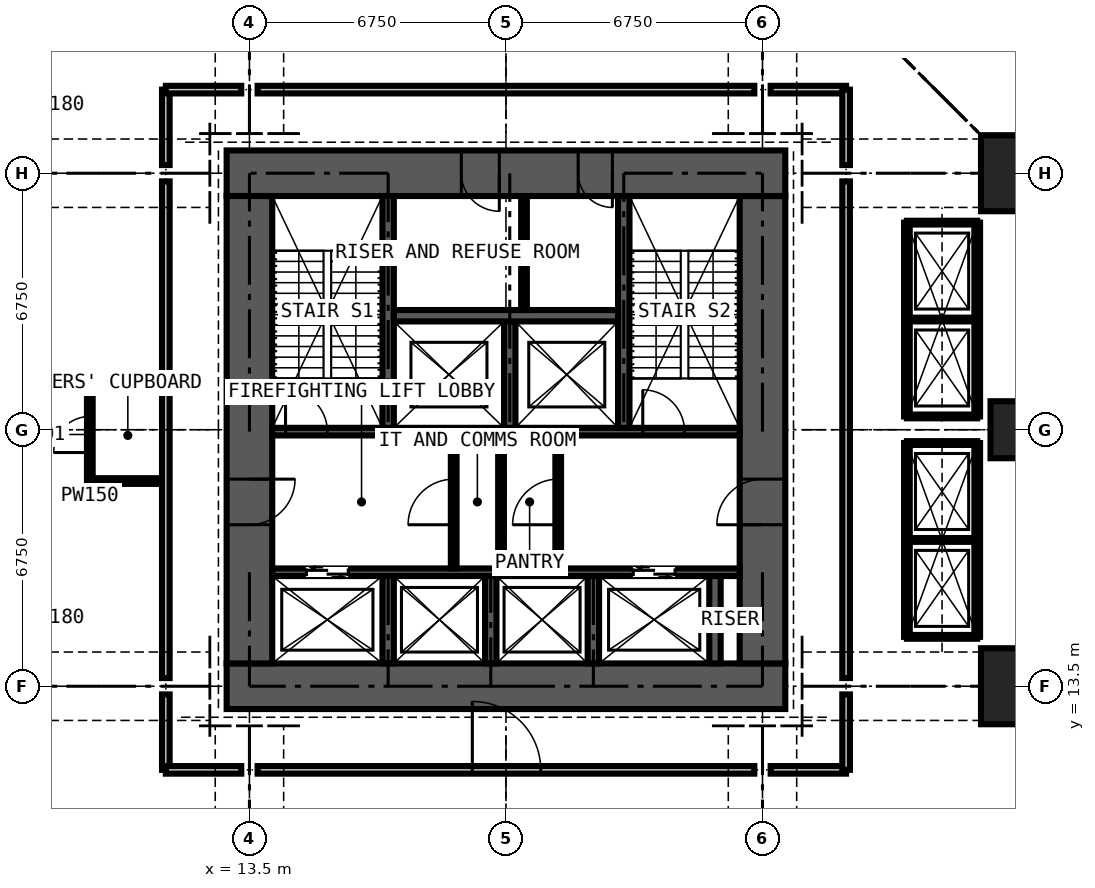
"""IFC4 building model, lengths in metres.
Left out: names, types, materials, properties, quantities, classifications, styles, units other than length and angle.
Written with IfcOpenShell. Run it as: python <this file> out.ifc"""

import sys

from ifc_helpers import new_model, si_unit, direction, frame, frame_2d, origin, origin_2d, place, context, subcontext, project, spatial, rectangle, extrude, element, fill, save


model = new_model("IFC4")
c1 = context("Model", 3, precision=1e-05, world=origin(), true_north=direction((0.0, 1.0)))
c2 = subcontext(c1, "Body", "Model", "MODEL_VIEW")
j1 = project(units=[si_unit("LENGTHUNIT", "METRE"), si_unit("PLANEANGLEUNIT", "RADIAN")], contexts=[c1])
p1 = place(None, origin())
s1 = spatial("IfcSite", under=j1, at=p1, CompositionType="ELEMENT")
p2 = place(p1, origin())
s2 = spatial("IfcBuilding", under=s1, at=p2, CompositionType="ELEMENT")
p3 = place(p2, frame((0.0, 0.0, 137.7)))
s3 = spatial("IfcBuildingStorey", under=s2, at=p3, CompositionType="ELEMENT", Elevation=137.7)
p4 = place(p3, frame((33.75, 13.5, 0.0), z_axis=(0.0, 0.0, 1.0), x_axis=(1.0, 0.0, 0.0)))
e1 = element("IfcColumn", 1, at=p4, inside=s3, PredefinedType="COLUMN", context=c2, shape_type="SweptSolid", body=[
    extrude(rectangle(XDim=2.0, YDim=2.0, at=origin_2d()), origin(), (0.0, 0.0, 1.0), 4.5),
])
p5 = place(p3, frame((33.75, 20.25, 0.0), z_axis=(0.0, 0.0, 1.0), x_axis=(1.0, 0.0, 0.0)))
e2 = element("IfcColumn", 2, at=p5, inside=s3, PredefinedType="COLUMN", context=c2, shape_type="SweptSolid", body=[
    extrude(rectangle(XDim=1.5, YDim=1.5, at=origin_2d()), origin(), (0.0, 0.0, 1.0), 4.5),
])
p6 = place(p3, frame((33.75, 27.0, 0.0), z_axis=(0.0, 0.0, 1.0), x_axis=(1.0, 0.0, 0.0)))
e3 = element("IfcColumn", 3, at=p6, inside=s3, PredefinedType="COLUMN", context=c2, shape_type="SweptSolid", body=[
    extrude(rectangle(XDim=2.0, YDim=2.0, at=origin_2d()), origin(), (0.0, 0.0, 1.0), 4.5),
])
p7 = place(p3, frame((12.9, 13.5, 0.0), z_axis=(0.0, 0.0, 1.0), x_axis=(1.0, 0.0, 0.0)))
e4 = element("IfcWall", 4, at=p7, inside=s3, PredefinedType="SHEAR", context=c2, shape_type="SweptSolid", body=[
    extrude(rectangle(XDim=14.7, YDim=1.2, at=frame_2d((7.35, 0.0))), origin(), (0.0, 0.0, 1.0), 4.5),
])
p8 = place(p3, frame((27.0, 14.1, 0.0), z_axis=(0.0, 0.0, 1.0), x_axis=(0.0, 1.0, 0.0)))
e5 = element("IfcWall", 5, at=p8, inside=s3, PredefinedType="SHEAR", context=c2, shape_type="SweptSolid", body=[
    extrude(rectangle(XDim=12.3, YDim=1.2, at=frame_2d((6.15, 0.0))), origin(), (0.0, 0.0, 1.0), 4.5),
])
p9 = place(p8, frame((3.65, 0.0, 0.0)))
e6 = element("IfcOpeningElement", 6, at=p9, cuts=e5, PredefinedType="OPENING", context=c2, shape_type="SweptSolid", body=[
    extrude(rectangle(XDim=1.2, YDim=2.2, at=frame_2d((0.6, 1.1))), frame((0.0, 0.61, 0.0), z_axis=(0.0, -1.0, 0.0), x_axis=(1.0, 0.0, 0.0)), (0.0, 0.0, 1.0), 1.22),
])
p10 = place(p3, frame((27.6, 27.0, 0.0), z_axis=(0.0, 0.0, 1.0), x_axis=(-1.0, 0.0, 0.0)))
e7 = element("IfcWall", 7, at=p10, inside=s3, PredefinedType="SHEAR", context=c2, shape_type="SweptSolid", body=[
    extrude(rectangle(XDim=14.7, YDim=1.2, at=frame_2d((7.35, 0.0))), origin(), (0.0, 0.0, 1.0), 4.5),
])
p11 = place(p10, frame((4.55, 0.0, 0.0)))
e8 = element("IfcOpeningElement", 8, at=p11, cuts=e7, PredefinedType="OPENING", context=c2, shape_type="SweptSolid", body=[
    extrude(rectangle(XDim=0.9, YDim=2.2, at=frame_2d((0.45, 1.1))), frame((0.0, 0.61, 0.0), z_axis=(0.0, -1.0, 0.0), x_axis=(1.0, 0.0, 0.0)), (0.0, 0.0, 1.0), 1.22),
])
p12 = place(p10, frame((7.525, 0.0, 0.0)))
e9 = element("IfcOpeningElement", 9, at=p12, cuts=e7, PredefinedType="OPENING", context=c2, shape_type="SweptSolid", body=[
    extrude(rectangle(XDim=1.0, YDim=2.2, at=frame_2d((0.5, 1.1))), frame((0.0, 0.61, 0.0), z_axis=(0.0, -1.0, 0.0), x_axis=(1.0, 0.0, 0.0)), (0.0, 0.0, 1.0), 1.22),
])
p13 = place(p3, frame((13.5, 26.4, 0.0), z_axis=(0.0, 0.0, 1.0), x_axis=(0.0, -1.0, 0.0)))
e10 = element("IfcWall", 10, at=p13, inside=s3, PredefinedType="SHEAR", context=c2, shape_type="SweptSolid", body=[
    extrude(rectangle(XDim=12.3, YDim=1.2, at=frame_2d((6.15, 0.0))), origin(), (0.0, 0.0, 1.0), 4.5),
])
p14 = place(p13, frame((7.45, 0.0, 0.0)))
e11 = element("IfcOpeningElement", 11, at=p14, cuts=e10, PredefinedType="OPENING", context=c2, shape_type="SweptSolid", body=[
    extrude(rectangle(XDim=1.2, YDim=2.2, at=frame_2d((0.6, 1.1))), frame((0.0, 0.61, 0.0), z_axis=(0.0, -1.0, 0.0), x_axis=(1.0, 0.0, 0.0)), (0.0, 0.0, 1.0), 1.22),
])
p15 = place(p3, frame((14.1, 16.5, 0.0), z_axis=(0.0, 0.0, 1.0), x_axis=(1.0, 0.0, 0.0)))
e12 = element("IfcWall", 12, at=p15, inside=s3, PredefinedType="SHEAR", context=c2, shape_type="SweptSolid", body=[
    extrude(rectangle(XDim=12.3, YDim=0.2, at=frame_2d((6.15, 0.0))), origin(), (0.0, 0.0, 1.0), 4.5),
])
p16 = place(p15, frame((0.9, 0.0, 0.0)))
e13 = element("IfcOpeningElement", 13, at=p16, cuts=e12, PredefinedType="OPENING", context=c2, shape_type="SweptSolid", body=[
    extrude(rectangle(XDim=1.1, YDim=2.2, at=frame_2d((0.55, 1.1))), frame((0.0, 0.11, 0.0), z_axis=(0.0, -1.0, 0.0), x_axis=(1.0, 0.0, 0.0)), (0.0, 0.0, 1.0), 0.22),
])
p17 = place(p15, frame((9.5, 0.0, 0.0)))
e14 = element("IfcOpeningElement", 14, at=p17, cuts=e12, PredefinedType="OPENING", context=c2, shape_type="SweptSolid", body=[
    extrude(rectangle(XDim=1.1, YDim=2.2, at=frame_2d((0.55, 1.1))), frame((0.0, 0.11, 0.0), z_axis=(0.0, -1.0, 0.0), x_axis=(1.0, 0.0, 0.0)), (0.0, 0.0, 1.0), 0.22),
])
p18 = place(p3, frame((14.1, 20.2, 0.0), z_axis=(0.0, 0.0, 1.0), x_axis=(1.0, 0.0, 0.0)))
e15 = element("IfcWall", 15, at=p18, inside=s3, PredefinedType="SHEAR", context=c2, shape_type="SweptSolid", body=[
    extrude(rectangle(XDim=12.3, YDim=0.2, at=frame_2d((6.15, 0.0))), origin(), (0.0, 0.0, 1.0), 4.5),
])
p19 = place(p18, frame((0.35, 0.0, 0.0)))
e16 = element("IfcOpeningElement", 16, at=p19, cuts=e15, PredefinedType="OPENING", context=c2, shape_type="SweptSolid", body=[
    extrude(rectangle(XDim=1.1, YDim=2.2, at=frame_2d((0.55, 1.1))), frame((0.0, 0.11, 0.0), z_axis=(0.0, -1.0, 0.0), x_axis=(1.0, 0.0, 0.0)), (0.0, 0.0, 1.0), 0.22),
])
p20 = place(p18, frame((9.75, 0.0, 0.0)))
e17 = element("IfcOpeningElement", 17, at=p20, cuts=e15, PredefinedType="OPENING", context=c2, shape_type="SweptSolid", body=[
    extrude(rectangle(XDim=1.1, YDim=2.2, at=frame_2d((0.55, 1.1))), frame((0.0, 0.11, 0.0), z_axis=(0.0, -1.0, 0.0), x_axis=(1.0, 0.0, 0.0)), (0.0, 0.0, 1.0), 0.22),
])
for number, where, z_axis, x_axis in (
    (18, (17.15, 20.3, 0.0), (0.0, 0.0, 1.0), (0.0, 1.0, 0.0)),
    (19, (23.35, 20.3, 0.0), (0.0, 0.0, 1.0), (0.0, 1.0, 0.0)),
):
    element("IfcWall", number, at=place(p3, frame(where, z_axis=z_axis, x_axis=x_axis)), inside=s3, PredefinedType="SHEAR", context=c2, shape_type="SweptSolid", body=[
        extrude(rectangle(XDim=6.1, YDim=0.3, at=frame_2d((3.05, 0.0))), origin(), (0.0, 0.0, 1.0), 4.5),
    ])
p21 = place(p3, frame((20.35, 20.3, 0.0), z_axis=(0.0, 0.0, 1.0), x_axis=(0.0, 1.0, 0.0)))
e20 = element("IfcWall", 20, at=p21, inside=s3, PredefinedType="SHEAR", context=c2, shape_type="SweptSolid", body=[
    extrude(rectangle(XDim=2.8, YDim=0.3, at=frame_2d((1.4, 0.0))), origin(), (0.0, 0.0, 1.0), 4.5),
])
p22 = place(p3, frame((17.3, 23.25, 0.0), z_axis=(0.0, 0.0, 1.0), x_axis=(1.0, 0.0, 0.0)))
e21 = element("IfcWall", 21, at=p22, inside=s3, PredefinedType="SHEAR", context=c2, shape_type="SweptSolid", body=[
    extrude(rectangle(XDim=5.9, YDim=0.3, at=frame_2d((2.95, 0.0))), origin(), (0.0, 0.0, 1.0), 4.5),
])
for number, where, z_axis, x_axis in (
    (22, (17.15, 14.1, 0.0), (0.0, 0.0, 1.0), (0.0, 1.0, 0.0)),
    (23, (19.85, 14.1, 0.0), (0.0, 0.0, 1.0), (0.0, 1.0, 0.0)),
    (24, (22.55, 14.1, 0.0), (0.0, 0.0, 1.0), (0.0, 1.0, 0.0)),
    (25, (25.75, 14.1, 0.0), (0.0, 0.0, 1.0), (0.0, 1.0, 0.0)),
):
    element("IfcWall", number, at=place(p3, frame(where, z_axis=z_axis, x_axis=x_axis)), inside=s3, PredefinedType="SHEAR", context=c2, shape_type="SweptSolid", body=[
        extrude(rectangle(XDim=2.3, YDim=0.3, at=frame_2d((1.15, 0.0))), origin(), (0.0, 0.0, 1.0), 4.5),
    ])
p23 = place(p3, frame((18.875, 16.6, 0.0), z_axis=(0.0, 0.0, 1.0), x_axis=(0.0, 1.0, 0.0)))
e26 = element("IfcWall", 26, at=p23, inside=s3, PredefinedType="PARTITIONING", context=c2, shape_type="SweptSolid", body=[
    extrude(rectangle(XDim=3.5, YDim=0.15, at=frame_2d((1.75, 0.0))), origin(), (0.0, 0.0, 1.0), 4.15),
])
p24 = place(p23, frame((1.15, 0.0, 0.0)))
e27 = element("IfcOpeningElement", 27, at=p24, cuts=e26, PredefinedType="OPENING", context=c2, shape_type="SweptSolid", body=[
    extrude(rectangle(XDim=1.2, YDim=2.2, at=frame_2d((0.6, 1.1))), frame((0.0, 0.085, 0.0), z_axis=(0.0, -1.0, 0.0), x_axis=(1.0, 0.0, 0.0)), (0.0, 0.0, 1.0), 0.17),
])
p25 = place(p3, frame((21.625, 16.6, 0.0), z_axis=(0.0, 0.0, 1.0), x_axis=(0.0, 1.0, 0.0)))
e28 = element("IfcWall", 28, at=p25, inside=s3, PredefinedType="PARTITIONING", context=c2, shape_type="SweptSolid", body=[
    extrude(rectangle(XDim=3.5, YDim=0.15, at=frame_2d((1.75, 0.0))), origin(), (0.0, 0.0, 1.0), 4.15),
])
p26 = place(p25, frame((1.15, 0.0, 0.0)))
e29 = element("IfcOpeningElement", 29, at=p26, cuts=e28, PredefinedType="OPENING", context=c2, shape_type="SweptSolid", body=[
    extrude(rectangle(XDim=1.2, YDim=2.2, at=frame_2d((0.6, 1.1))), frame((0.0, 0.085, 0.0), z_axis=(0.0, -1.0, 0.0), x_axis=(1.0, 0.0, 0.0)), (0.0, 0.0, 1.0), 0.17),
])
p27 = place(p3, frame((20.12, 16.6, 0.0), z_axis=(0.0, 0.0, 1.0), x_axis=(0.0, 1.0, 0.0)))
e30 = element("IfcWall", 30, at=p27, inside=s3, PredefinedType="PARTITIONING", context=c2, shape_type="SweptSolid", body=[
    extrude(rectangle(XDim=3.5, YDim=0.15, at=frame_2d((1.75, 0.0))), origin(), (0.0, 0.0, 1.0), 4.15),
])
p28 = place(p3, frame((20.725, 23.4, 0.0), z_axis=(0.0, 0.0, 1.0), x_axis=(0.0, 1.0, 0.0)))
e31 = element("IfcWall", 31, at=p28, inside=s3, PredefinedType="PARTITIONING", context=c2, shape_type="SweptSolid", body=[
    extrude(rectangle(XDim=3.0, YDim=0.15, at=frame_2d((1.5, 0.0))), origin(), (0.0, 0.0, 1.0), 4.15),
])
p29 = place(p3, frame((9.3, 18.9, 0.0), z_axis=(0.0, 0.0, 1.0), x_axis=(0.0, 1.0, 0.0)))
e32 = element("IfcWall", 32, at=p29, inside=s3, PredefinedType="PARTITIONING", context=c2, shape_type="SweptSolid", body=[
    extrude(rectangle(XDim=2.4, YDim=0.15, at=frame_2d((1.2, 0.0))), origin(), (0.0, 0.0, 1.0), 4.15),
])
p30 = place(p29, frame((0.75, 0.0, 0.0)))
e33 = element("IfcOpeningElement", 33, at=p30, cuts=e32, PredefinedType="OPENING", context=c2, shape_type="SweptSolid", body=[
    extrude(rectangle(XDim=0.95, YDim=2.2, at=frame_2d((0.475, 1.1))), frame((0.0, 0.085, 0.0), z_axis=(0.0, -1.0, 0.0), x_axis=(1.0, 0.0, 0.0)), (0.0, 0.0, 1.0), 0.17),
])
for number, where, z_axis, x_axis in (
    (34, (9.3, 18.9, 0.0), (0.0, 0.0, 1.0), (1.0, 0.0, 0.0)),
    (35, (9.3, 21.3, 0.0), (0.0, 0.0, 1.0), (1.0, 0.0, 0.0)),
):
    element("IfcWall", number, at=place(p3, frame(where, z_axis=z_axis, x_axis=x_axis)), inside=s3, PredefinedType="PARTITIONING", context=c2, shape_type="SweptSolid", body=[
        extrude(rectangle(XDim=2.0, YDim=0.15, at=frame_2d((1.0, 0.0))), origin(), (0.0, 0.0, 1.0), 4.15),
    ])
for number, where, z_axis, x_axis in (
    (36, (11.3, 11.3, 0.0), (0.0, 0.0, 1.0), (0.0, 1.0, 0.0)),
    (37, (11.3, 11.3, 0.0), (0.0, 0.0, 1.0), (1.0, 0.0, 0.0)),
):
    element("IfcWall", number, at=place(p3, frame(where, z_axis=z_axis, x_axis=x_axis)), inside=s3, PredefinedType="PARTITIONING", context=c2, shape_type="SweptSolid", body=[
        extrude(rectangle(XDim=1.985, YDim=0.2, at=frame_2d((0.992, 0.0))), origin(), (0.0, 0.0, 1.0), 4.15),
    ])
p31 = place(p3, frame((11.3, 13.715, 0.0), z_axis=(0.0, 0.0, 1.0), x_axis=(0.0, 1.0, 0.0)))
e38 = element("IfcWall", 38, at=p31, inside=s3, PredefinedType="PARTITIONING", context=c2, shape_type="SweptSolid", body=[
    extrude(rectangle(XDim=13.07, YDim=0.2, at=frame_2d((6.535, 0.0))), origin(), (0.0, 0.0, 1.0), 4.15),
])
for number, where, z_axis, x_axis in (
    (39, (11.3, 27.215, 0.0), (0.0, 0.0, 1.0), (0.0, 1.0, 0.0)),
    (40, (11.3, 29.2, 0.0), (0.0, 0.0, 1.0), (1.0, 0.0, 0.0)),
):
    element("IfcWall", number, at=place(p3, frame(where, z_axis=z_axis, x_axis=x_axis)), inside=s3, PredefinedType="PARTITIONING", context=c2, shape_type="SweptSolid", body=[
        extrude(rectangle(XDim=1.985, YDim=0.2, at=frame_2d((0.992, 0.0))), origin(), (0.0, 0.0, 1.0), 4.15),
    ])
p32 = place(p3, frame((13.715, 11.3, 0.0), z_axis=(0.0, 0.0, 1.0), x_axis=(1.0, 0.0, 0.0)))
e41 = element("IfcWall", 41, at=p32, inside=s3, PredefinedType="PARTITIONING", context=c2, shape_type="SweptSolid", body=[
    extrude(rectangle(XDim=13.07, YDim=0.2, at=frame_2d((6.535, 0.0))), origin(), (0.0, 0.0, 1.0), 4.15),
])
p33 = place(p32, frame((5.65, 0.0, 0.0)))
e42 = element("IfcOpeningElement", 42, at=p33, cuts=e41, PredefinedType="OPENING", context=c2, shape_type="SweptSolid", body=[
    extrude(rectangle(XDim=1.8, YDim=2.4, at=frame_2d((0.9, 1.2))), frame((0.0, 0.11, 0.0), z_axis=(0.0, -1.0, 0.0), x_axis=(1.0, 0.0, 0.0)), (0.0, 0.0, 1.0), 0.22),
])
p34 = place(p3, frame((13.715, 29.2, 0.0), z_axis=(0.0, 0.0, 1.0), x_axis=(1.0, 0.0, 0.0)))
e43 = element("IfcWall", 43, at=p34, inside=s3, PredefinedType="PARTITIONING", context=c2, shape_type="SweptSolid", body=[
    extrude(rectangle(XDim=13.07, YDim=0.2, at=frame_2d((6.535, 0.0))), origin(), (0.0, 0.0, 1.0), 4.15),
])
for number, where, z_axis, x_axis in (
    (44, (27.215, 11.3, 0.0), (0.0, 0.0, 1.0), (1.0, 0.0, 0.0)),
    (45, (27.215, 29.2, 0.0), (0.0, 0.0, 1.0), (1.0, 0.0, 0.0)),
    (46, (29.2, 11.3, 0.0), (0.0, 0.0, 1.0), (0.0, 1.0, 0.0)),
):
    element("IfcWall", number, at=place(p3, frame(where, z_axis=z_axis, x_axis=x_axis)), inside=s3, PredefinedType="PARTITIONING", context=c2, shape_type="SweptSolid", body=[
        extrude(rectangle(XDim=1.985, YDim=0.2, at=frame_2d((0.992, 0.0))), origin(), (0.0, 0.0, 1.0), 4.15),
    ])
p35 = place(p3, frame((29.2, 13.715, 0.0), z_axis=(0.0, 0.0, 1.0), x_axis=(0.0, 1.0, 0.0)))
e47 = element("IfcWall", 47, at=p35, inside=s3, PredefinedType="PARTITIONING", context=c2, shape_type="SweptSolid", body=[
    extrude(rectangle(XDim=13.07, YDim=0.2, at=frame_2d((6.535, 0.0))), origin(), (0.0, 0.0, 1.0), 4.15),
])
p36 = place(p3, frame((29.2, 27.215, 0.0), z_axis=(0.0, 0.0, 1.0), x_axis=(0.0, 1.0, 0.0)))
e48 = element("IfcWall", 48, at=p36, inside=s3, PredefinedType="PARTITIONING", context=c2, shape_type="SweptSolid", body=[
    extrude(rectangle(XDim=1.985, YDim=0.2, at=frame_2d((0.992, 0.0))), origin(), (0.0, 0.0, 1.0), 4.15),
])
p37 = place(p3, frame((30.8, 14.8, 0.0), z_axis=(0.0, 0.0, 1.0), x_axis=(0.0, 1.0, 0.0)))
e49 = element("IfcWall", 49, at=p37, inside=s3, PredefinedType="PARTITIONING", context=c2, shape_type="SweptSolid", body=[
    extrude(rectangle(XDim=5.1, YDim=0.15, at=frame_2d((2.55, 0.0))), origin(), (0.0, 0.0, 1.0), 4.15),
])
p38 = place(p3, frame((30.8, 14.8, 0.0), z_axis=(0.0, 0.0, 1.0), x_axis=(1.0, 0.0, 0.0)))
e50 = element("IfcWall", 50, at=p38, inside=s3, PredefinedType="SHEAR", context=c2, shape_type="SweptSolid", body=[
    extrude(rectangle(XDim=1.85, YDim=0.1, at=frame_2d((0.925, 0.0))), origin(), (0.0, 0.0, 1.0), 3.35),
])
for number, where, z_axis, x_axis in (
    (51, (30.8, 17.35, 0.0), (0.0, 0.0, 1.0), (1.0, 0.0, 0.0)),
    (52, (30.8, 19.9, 0.0), (0.0, 0.0, 1.0), (1.0, 0.0, 0.0)),
):
    element("IfcWall", number, at=place(p3, frame(where, z_axis=z_axis, x_axis=x_axis)), inside=s3, PredefinedType="SHEAR", context=c2, shape_type="SweptSolid", body=[
        extrude(rectangle(XDim=1.85, YDim=0.1, at=frame_2d((0.925, 0.0))), origin(), (0.0, 0.0, 1.0), 4.15),
    ])
p39 = place(p3, frame((30.8, 20.6, 0.0), z_axis=(0.0, 0.0, 1.0), x_axis=(0.0, 1.0, 0.0)))
e53 = element("IfcWall", 53, at=p39, inside=s3, PredefinedType="PARTITIONING", context=c2, shape_type="SweptSolid", body=[
    extrude(rectangle(XDim=5.1, YDim=0.15, at=frame_2d((2.55, 0.0))), origin(), (0.0, 0.0, 1.0), 4.15),
])
for number, where, z_axis, x_axis in (
    (54, (30.8, 20.6, 0.0), (0.0, 0.0, 1.0), (1.0, 0.0, 0.0)),
    (55, (30.8, 23.15, 0.0), (0.0, 0.0, 1.0), (1.0, 0.0, 0.0)),
):
    element("IfcWall", number, at=place(p3, frame(where, z_axis=z_axis, x_axis=x_axis)), inside=s3, PredefinedType="SHEAR", context=c2, shape_type="SweptSolid", body=[
        extrude(rectangle(XDim=1.85, YDim=0.1, at=frame_2d((0.925, 0.0))), origin(), (0.0, 0.0, 1.0), 4.15),
    ])
p40 = place(p3, frame((30.8, 25.7, 0.0), z_axis=(0.0, 0.0, 1.0), x_axis=(1.0, 0.0, 0.0)))
e56 = element("IfcWall", 56, at=p40, inside=s3, PredefinedType="SHEAR", context=c2, shape_type="SweptSolid", body=[
    extrude(rectangle(XDim=1.85, YDim=0.1, at=frame_2d((0.925, 0.0))), origin(), (0.0, 0.0, 1.0), 3.35),
])
for number, where, z_axis, x_axis in (
    (57, (32.65, 14.8, 0.0), (0.0, 0.0, 1.0), (0.0, 1.0, 0.0)),
    (58, (32.65, 20.6, 0.0), (0.0, 0.0, 1.0), (0.0, 1.0, 0.0)),
):
    element("IfcWall", number, at=place(p3, frame(where, z_axis=z_axis, x_axis=x_axis)), inside=s3, PredefinedType="PARTITIONING", context=c2, shape_type="SweptSolid", body=[
        extrude(rectangle(XDim=5.1, YDim=0.15, at=frame_2d((2.55, 0.0))), origin(), (0.0, 0.0, 1.0), 4.15),
    ])
p41 = place(p16, origin())
e59 = element("IfcDoor", 59, at=p41, inside=s3, OperationType="DOUBLE_DOOR_SLIDING", PredefinedType="DOOR", context=c2, shape_type="SweptSolid", body=[
    extrude(rectangle(XDim=1.1, YDim=2.2, at=frame_2d((0.55, 1.1))), frame((0.0, 0.025, 0.0), z_axis=(0.0, -1.0, 0.0), x_axis=(1.0, 0.0, 0.0)), (0.0, 0.0, 1.0), 0.05),
])
fill(e13, e59)
p42 = place(p17, origin())
e60 = element("IfcDoor", 60, at=p42, inside=s3, OperationType="DOUBLE_DOOR_SLIDING", PredefinedType="DOOR", context=c2, shape_type="SweptSolid", body=[
    extrude(rectangle(XDim=1.1, YDim=2.2, at=frame_2d((0.55, 1.1))), frame((0.0, 0.025, 0.0), z_axis=(0.0, -1.0, 0.0), x_axis=(1.0, 0.0, 0.0)), (0.0, 0.0, 1.0), 0.05),
])
fill(e14, e60)
p43 = place(p14, origin())
e61 = element("IfcDoor", 61, at=p43, inside=s3, OperationType="DOUBLE_DOOR_SINGLE_SWING", PredefinedType="DOOR", context=c2, shape_type="SweptSolid", body=[
    extrude(rectangle(XDim=1.2, YDim=2.2, at=frame_2d((0.6, 1.1))), frame((0.0, 0.025, 0.0), z_axis=(0.0, -1.0, 0.0), x_axis=(1.0, 0.0, 0.0)), (0.0, 0.0, 1.0), 0.05),
])
fill(e11, e61)
p44 = place(p9, origin())
e62 = element("IfcDoor", 62, at=p44, inside=s3, OperationType="DOUBLE_DOOR_SINGLE_SWING", PredefinedType="DOOR", context=c2, shape_type="SweptSolid", body=[
    extrude(rectangle(XDim=1.2, YDim=2.2, at=frame_2d((0.6, 1.1))), frame((0.0, 0.025, 0.0), z_axis=(0.0, -1.0, 0.0), x_axis=(1.0, 0.0, 0.0)), (0.0, 0.0, 1.0), 0.05),
])
fill(e6, e62)
p45 = place(p24, origin())
e63 = element("IfcDoor", 63, at=p45, inside=s3, OperationType="DOUBLE_DOOR_SINGLE_SWING", PredefinedType="DOOR", context=c2, shape_type="SweptSolid", body=[
    extrude(rectangle(XDim=1.2, YDim=2.2, at=frame_2d((0.6, 1.1))), frame((0.0, 0.025, 0.0), z_axis=(0.0, -1.0, 0.0), x_axis=(1.0, 0.0, 0.0)), (0.0, 0.0, 1.0), 0.05),
])
fill(e27, e63)
p46 = place(p26, origin())
e64 = element("IfcDoor", 64, at=p46, inside=s3, OperationType="DOUBLE_DOOR_SINGLE_SWING", PredefinedType="DOOR", context=c2, shape_type="SweptSolid", body=[
    extrude(rectangle(XDim=1.2, YDim=2.2, at=frame_2d((0.6, 1.1))), frame((0.0, 0.025, 0.0), z_axis=(0.0, -1.0, 0.0), x_axis=(1.0, 0.0, 0.0)), (0.0, 0.0, 1.0), 0.05),
])
fill(e29, e64)
p47 = place(p11, origin())
e65 = element("IfcDoor", 65, at=p47, inside=s3, OperationType="SINGLE_SWING_LEFT", PredefinedType="DOOR", context=c2, shape_type="SweptSolid", body=[
    extrude(rectangle(XDim=0.9, YDim=2.2, at=frame_2d((0.45, 1.1))), frame((0.0, 0.4, 0.0), z_axis=(0.0, -1.0, 0.0), x_axis=(1.0, 0.0, 0.0)), (0.0, 0.0, 1.0), 0.8),
])
fill(e8, e65)
p48 = place(p12, origin())
e66 = element("IfcDoor", 66, at=p48, inside=s3, OperationType="SINGLE_SWING_LEFT", PredefinedType="DOOR", context=c2, shape_type="SweptSolid", body=[
    extrude(rectangle(XDim=1.0, YDim=2.2, at=frame_2d((0.5, 1.1))), frame((0.0, 0.025, 0.0), z_axis=(0.0, -1.0, 0.0), x_axis=(1.0, 0.0, 0.0)), (0.0, 0.0, 1.0), 0.05),
])
fill(e9, e66)
p49 = place(p19, origin())
e67 = element("IfcDoor", 67, at=p49, inside=s3, OperationType="SINGLE_SWING_LEFT", PredefinedType="DOOR", context=c2, shape_type="SweptSolid", body=[
    extrude(rectangle(XDim=1.1, YDim=2.2, at=frame_2d((0.55, 1.1))), frame((0.0, 0.025, 0.0), z_axis=(0.0, -1.0, 0.0), x_axis=(1.0, 0.0, 0.0)), (0.0, 0.0, 1.0), 0.05),
])
fill(e16, e67)
p50 = place(p20, origin())
e68 = element("IfcDoor", 68, at=p50, inside=s3, OperationType="SINGLE_SWING_LEFT", PredefinedType="DOOR", context=c2, shape_type="SweptSolid", body=[
    extrude(rectangle(XDim=1.1, YDim=2.2, at=frame_2d((0.55, 1.1))), frame((0.0, 0.025, 0.0), z_axis=(0.0, -1.0, 0.0), x_axis=(1.0, 0.0, 0.0)), (0.0, 0.0, 1.0), 0.05),
])
fill(e17, e68)
p51 = place(p30, origin())
e69 = element("IfcDoor", 69, at=p51, inside=s3, OperationType="SINGLE_SWING_LEFT", PredefinedType="DOOR", context=c2, shape_type="SweptSolid", body=[
    extrude(rectangle(XDim=0.95, YDim=2.2, at=frame_2d((0.475, 1.1))), frame((0.0, 0.025, 0.0), z_axis=(0.0, -1.0, 0.0), x_axis=(1.0, 0.0, 0.0)), (0.0, 0.0, 1.0), 0.05),
])
fill(e33, e69)
p52 = place(p33, origin())
e70 = element("IfcDoor", 70, at=p52, inside=s3, OperationType="DOUBLE_DOOR_SINGLE_SWING", PredefinedType="DOOR", context=c2, shape_type="SweptSolid", body=[
    extrude(rectangle(XDim=1.8, YDim=2.4, at=frame_2d((0.9, 1.2))), frame((0.0, 0.025, 0.0), z_axis=(0.0, -1.0, 0.0), x_axis=(1.0, 0.0, 0.0)), (0.0, 0.0, 1.0), 0.05),
])
fill(e42, e70)
save(model, sys.argv[1])
